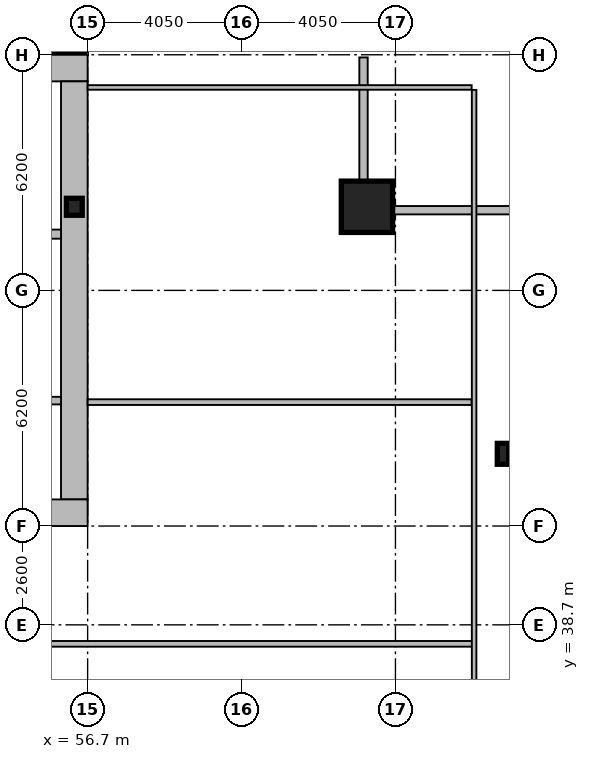
"""IFC4 building model, lengths in metres.
Left out: names, types, materials, properties, quantities, classifications, styles, units other than length and angle.
Written with IfcOpenShell. Run it as: python <this file> out.ifc"""

import sys

from ifc_helpers import new_model, si_unit, direction, frame, frame_2d, origin, origin_2d, place, context, subcontext, project, spatial, rectangle, hollow_rectangle, i_section, extrude, element, fill, save


model = new_model("IFC4")
c1 = context("Model", 3, precision=1e-05, world=origin(), true_north=direction((0.0, 1.0)))
c2 = subcontext(c1, "Body", "Model", "MODEL_VIEW")
j1 = project(units=[si_unit("LENGTHUNIT", "METRE"), si_unit("PLANEANGLEUNIT", "RADIAN")], contexts=[c1])
p1 = place(None, origin())
s1 = spatial("IfcSite", under=j1, at=p1, CompositionType="ELEMENT")
p2 = place(p1, origin())
s2 = spatial("IfcBuilding", under=s1, at=p2, CompositionType="ELEMENT")
p3 = place(p2, frame((0.0, 0.0, 154.2)))
s3 = spatial("IfcBuildingStorey", under=s2, at=p3, CompositionType="ELEMENT", Elevation=154.2)
p4 = place(p3, frame((16.2, 53.35, 0.0), z_axis=(0.0, 0.0, 1.0), x_axis=(1.0, 0.0, 0.0)))
e1 = element("IfcWall", 1, at=p4, inside=s3, PredefinedType="SHEAR", context=c2, shape_type="SweptSolid", body=[
    extrude(rectangle(XDim=40.5, YDim=0.7, at=frame_2d((20.25, 0.0))), origin(), (0.0, 0.0, 1.0), 3.44),
])
p5 = place(p3, frame((56.35, 53.0, 0.0), z_axis=(0.0, 0.0, 1.0), x_axis=(0.0, -1.0, 0.0)))
e2 = element("IfcWall", 2, at=p5, inside=s3, PredefinedType="SHEAR", context=c2, shape_type="SweptSolid", body=[
    extrude(rectangle(XDim=11.0, YDim=0.7, at=frame_2d((5.5, 0.0))), origin(), (0.0, 0.0, 1.0), 3.44),
])
p6 = place(p3, frame((56.7, 41.65, 0.0), z_axis=(0.0, 0.0, 1.0), x_axis=(-1.0, 0.0, 0.0)))
e3 = element("IfcWall", 3, at=p6, inside=s3, PredefinedType="SHEAR", context=c2, shape_type="SweptSolid", body=[
    extrude(rectangle(XDim=2.45, YDim=0.7, at=frame_2d((1.225, 0.0))), origin(), (0.0, 0.0, 1.0), 3.44),
])
p7 = place(p3, frame((48.63, 48.98, 0.0), z_axis=(0.0, 0.0, 1.0), x_axis=(1.0, 0.0, 0.0)))
e4 = element("IfcWall", 4, at=p7, inside=s3, PredefinedType="SHEAR", context=c2, shape_type="SweptSolid", body=[
    extrude(rectangle(XDim=7.37, YDim=0.24, at=frame_2d((3.685, 0.0))), origin(), (0.0, 0.0, 1.0), 3.44),
])
p8 = place(p7, frame((6.1, 0.0, 0.0)))
e5 = element("IfcOpeningElement", 5, at=p8, cuts=e4, PredefinedType="OPENING", context=c2, shape_type="SweptSolid", body=[
    extrude(rectangle(XDim=1.05, YDim=2.15, at=frame_2d((0.525, 1.075))), frame((0.0, 0.13, 0.0), z_axis=(0.0, -1.0, 0.0), x_axis=(1.0, 0.0, 0.0)), (0.0, 0.0, 1.0), 0.26),
])
p9 = place(p3, frame((64.05, 49.7, 0.0), z_axis=(0.0, 0.0, 1.0), x_axis=(1.0, 0.0, 0.0)))
e6 = element("IfcColumn", 6, at=p9, inside=s3, PredefinedType="COLUMN", context=c2, shape_type="SweptSolid", body=[
    extrude(hollow_rectangle(XDim=1.35, YDim=1.35, WallThickness=0.065, at=origin_2d()), origin(), (0.0, 0.0, 1.0), 3.6),
])
p10 = place(p3, frame((67.63, 43.2, 0.0), z_axis=(0.0, 0.0, 1.0), x_axis=(1.0, 0.0, 0.0)))
e7 = element("IfcColumn", 7, at=p10, inside=s3, PredefinedType="COLUMN", context=c2, shape_type="SweptSolid", body=[
    extrude(i_section(OverallWidth=0.3, OverallDepth=0.55, WebThickness=0.015, FlangeThickness=0.029, at=origin_2d()), origin(), (0.0, 0.0, 1.0), 3.6),
])
p11 = place(p3, frame((56.35, 49.7, 0.0), z_axis=(0.0, 0.0, 1.0), x_axis=(1.0, 0.0, 0.0)))
e8 = element("IfcColumn", 8, at=p11, inside=s3, PredefinedType="COLUMN", context=c2, shape_type="SweptSolid", body=[
    extrude(i_section(OverallWidth=0.416, OverallDepth=0.446, WebThickness=0.039, FlangeThickness=0.063, at=origin_2d()), origin(), (0.0, 0.0, 1.0), 3.6),
])
p12 = place(p3, frame((63.96, 53.63, 0.0), z_axis=(0.0, 0.0, 1.0), x_axis=(0.0, -1.0, 0.0)))
e9 = element("IfcWall", 9, at=p12, inside=s3, PredefinedType="SOLIDWALL", context=c2, shape_type="SweptSolid", body=[
    extrude(rectangle(XDim=3.91, YDim=0.22, at=frame_2d((1.955, 0.0))), origin(), (0.0, 0.0, 1.0), 2.83),
])
p13 = place(p3, frame((63.85, 49.61, 0.0), z_axis=(0.0, 0.0, 1.0), x_axis=(1.0, 0.0, 0.0)))
e10 = element("IfcWall", 10, at=p13, inside=s3, PredefinedType="SOLIDWALL", context=c2, shape_type="SweptSolid", body=[
    extrude(rectangle(XDim=4.22, YDim=0.22, at=frame_2d((2.11, 0.0))), origin(), (0.0, 0.0, 1.0), 2.83),
])
p14 = place(p3, frame((51.9, 44.6, 0.0), z_axis=(0.0, 0.0, 1.0), x_axis=(1.0, 0.0, 0.0)))
e11 = element("IfcWall", 11, at=p14, inside=s3, PredefinedType="PARTITIONING", context=c2, shape_type="SweptSolid", body=[
    extrude(rectangle(XDim=4.1, YDim=0.2, at=frame_2d((2.05, 0.0))), origin(), (0.0, 0.0, 1.0), 3.44),
])
p15 = place(p14, frame((1.15, 0.0, 0.0)))
e12 = element("IfcOpeningElement", 12, at=p15, cuts=e11, PredefinedType="OPENING", context=c2, shape_type="SweptSolid", body=[
    extrude(rectangle(XDim=1.05, YDim=2.15, at=frame_2d((0.525, 1.075))), frame((0.0, 0.11, 0.0), z_axis=(0.0, -1.0, 0.0), x_axis=(1.0, 0.0, 0.0)), (0.0, 0.0, 1.0), 0.22),
])
p16 = place(p3, frame((54.35, 38.2, 0.0), z_axis=(0.0, 0.0, 1.0), x_axis=(1.0, 0.0, 0.0)))
e13 = element("IfcWall", 13, at=p16, inside=s3, PredefinedType="PARTITIONING", context=c2, shape_type="SweptSolid", body=[
    extrude(rectangle(XDim=12.52, YDim=0.15, at=frame_2d((6.26, 0.0))), origin(), (0.0, 0.0, 1.0), 2.73),
])
p17 = place(p16, frame((3.25, 0.0, 0.0)))
e14 = element("IfcOpeningElement", 14, at=p17, cuts=e13, PredefinedType="OPENING", context=c2, shape_type="SweptSolid", body=[
    extrude(rectangle(XDim=0.95, YDim=2.05, at=frame_2d((0.475, 1.025))), frame((0.0, 0.085, 0.0), z_axis=(0.0, -1.0, 0.0), x_axis=(1.0, 0.0, 0.0)), (0.0, 0.0, 1.0), 0.17),
])
p18 = place(p3, frame((56.7, 44.56, 0.0), z_axis=(0.0, 0.0, 1.0), x_axis=(1.0, 0.0, 0.0)))
e15 = element("IfcWall", 15, at=p18, inside=s3, PredefinedType="PARTITIONING", context=c2, shape_type="SweptSolid", body=[
    extrude(rectangle(XDim=10.105, YDim=0.15, at=frame_2d((5.052, 0.0))), origin(), (0.0, 0.0, 1.0), 2.83),
])
p19 = place(p18, frame((0.9, 0.0, 0.0)))
e16 = element("IfcOpeningElement", 16, at=p19, cuts=e15, PredefinedType="OPENING", context=c2, shape_type="SweptSolid", body=[
    extrude(rectangle(XDim=0.9, YDim=2.05, at=frame_2d((0.45, 1.025))), frame((0.0, 0.085, 0.0), z_axis=(0.0, -1.0, 0.0), x_axis=(1.0, 0.0, 0.0)), (0.0, 0.0, 1.0), 0.17),
])
p20 = place(p3, frame((66.87, 10.665, 0.0), z_axis=(0.0, 0.0, 1.0), x_axis=(0.0, 1.0, 0.0)))
e17 = element("IfcWall", 17, at=p20, inside=s3, PredefinedType="PARTITIONING", context=c2, shape_type="SweptSolid", body=[
    extrude(rectangle(XDim=42.11, YDim=0.12, at=frame_2d((21.055, 0.0))), origin(), (0.0, 0.0, 1.0), 2.73),
])
p21 = place(p3, frame((56.7, 52.84, 0.0), z_axis=(0.0, 0.0, 1.0), x_axis=(1.0, 0.0, 0.0)))
e18 = element("IfcWall", 18, at=p21, inside=s3, PredefinedType="PARTITIONING", context=c2, shape_type="SweptSolid", body=[
    extrude(rectangle(XDim=10.105, YDim=0.12, at=frame_2d((5.052, 0.0))), origin(), (0.0, 0.0, 1.0), 3.44),
])
p22 = place(p17, origin())
e19 = element("IfcDoor", 19, at=p22, inside=s3, OperationType="SINGLE_SWING_LEFT", PredefinedType="DOOR", context=c2, shape_type="SweptSolid", body=[
    extrude(rectangle(XDim=0.95, YDim=2.05, at=frame_2d((0.475, 1.025))), frame((0.0, 0.025, 0.0), z_axis=(0.0, -1.0, 0.0), x_axis=(1.0, 0.0, 0.0)), (0.0, 0.0, 1.0), 0.05),
])
fill(e14, e19)
p23 = place(p19, origin())
e20 = element("IfcDoor", 20, at=p23, inside=s3, OperationType="SINGLE_SWING_LEFT", PredefinedType="DOOR", context=c2, shape_type="SweptSolid", body=[
    extrude(rectangle(XDim=0.9, YDim=2.05, at=frame_2d((0.45, 1.025))), frame((0.0, 0.025, 0.0), z_axis=(0.0, -1.0, 0.0), x_axis=(1.0, 0.0, 0.0)), (0.0, 0.0, 1.0), 0.05),
])
fill(e16, e20)
save(model, sys.argv[1])
